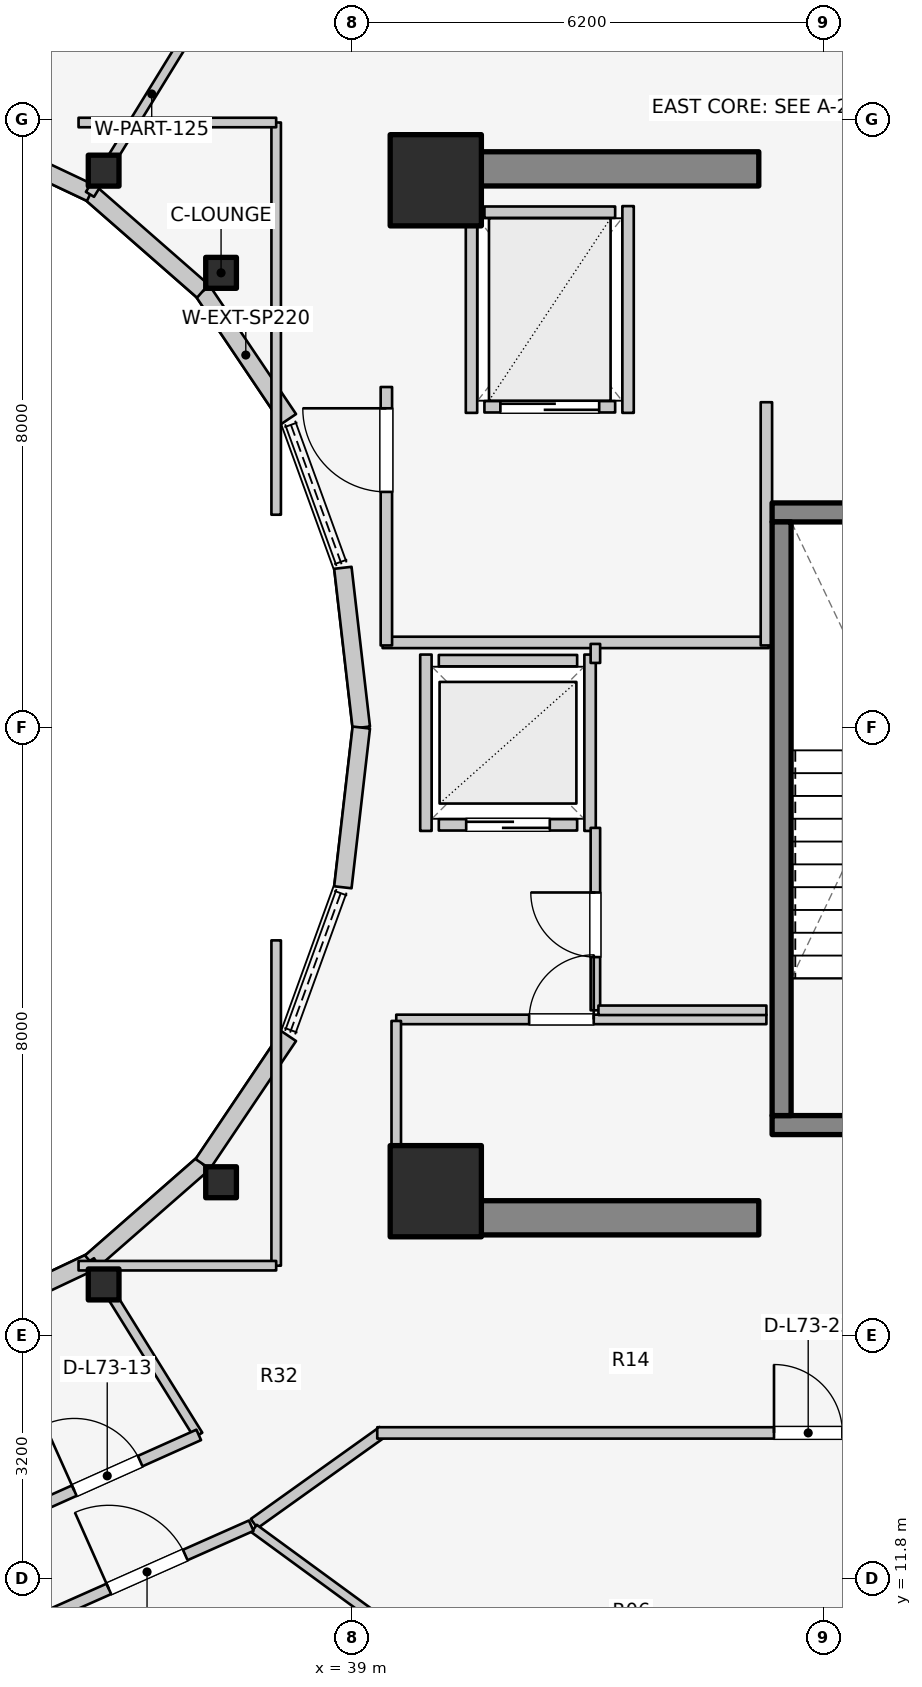
"""IFC4 building model, lengths in metres.
Left out: names, types, materials, properties, quantities, classifications, styles, units other than length and angle.
Written with IfcOpenShell. Run it as: python <this file> out.ifc"""

import sys

from ifc_helpers import new_model, si_unit, direction, frame, frame_2d, origin, origin_2d, place, context, subcontext, project, spatial, rectangle, i_section, extrude, element, fill, save


model = new_model("IFC4")
c1 = context("Model", 3, precision=1e-05, world=origin(), true_north=direction((0.0, 1.0)))
c2 = subcontext(c1, "Body", "Model", "MODEL_VIEW")
j1 = project(units=[si_unit("LENGTHUNIT", "METRE"), si_unit("PLANEANGLEUNIT", "RADIAN")], contexts=[c1])
p1 = place(None, origin())
s1 = spatial("IfcSite", under=j1, at=p1, CompositionType="ELEMENT")
p2 = place(p1, origin())
s2 = spatial("IfcBuilding", under=s1, at=p2, CompositionType="ELEMENT")
p3 = place(p2, frame((0.0, 0.0, 238.8)))
s3 = spatial("IfcBuildingStorey", under=s2, at=p3, CompositionType="ELEMENT", Elevation=238.8)
for number, where, z_axis, x_axis in (
    (1, (39.85, 16.55, 0.0), (0.0, 0.0, 1.0), (1.0, 0.0, 0.0)),
    (2, (39.85, 30.35, 0.0), (0.0, 0.0, 1.0), (1.0, 0.0, 0.0)),
):
    element("IfcWall", number, at=place(p3, frame(where, z_axis=z_axis, x_axis=x_axis)), inside=s3, PredefinedType="SHEAR", context=c2, shape_type="SweptSolid", body=[
        extrude(rectangle(XDim=4.5, YDim=0.45, at=frame_2d((2.25, 0.0))), origin(), (0.0, 0.0, 1.0), 3.6),
    ])
p4 = place(p3, frame((44.525, 17.77, 0.0), z_axis=(0.0, 0.0, 1.0), x_axis=(1.0, 0.0, 0.0)))
e3 = element("IfcWall", 3, at=p4, inside=s3, PredefinedType="SOLIDWALL", context=c2, shape_type="SweptSolid", body=[
    extrude(rectangle(XDim=3.37, YDim=0.25, at=frame_2d((1.685, 0.0))), origin(), (0.0, 0.0, 1.0), 3.6),
])
p5 = place(p4, frame((1.135, 0.0, 0.0)))
e4 = element("IfcOpeningElement", 4, at=p5, cuts=e3, PredefinedType="OPENING", context=c2, shape_type="SweptSolid", body=[
    extrude(rectangle(XDim=1.1, YDim=2.1, at=frame_2d((0.55, 1.05))), frame((0.0, 0.135, 0.0), z_axis=(0.0, -1.0, 0.0), x_axis=(1.0, 0.0, 0.0)), (0.0, 0.0, 1.0), 0.27),
])
p6 = place(p3, frame((44.525, 25.83, 0.0), z_axis=(0.0, 0.0, 1.0), x_axis=(1.0, 0.0, 0.0)))
e5 = element("IfcWall", 5, at=p6, inside=s3, PredefinedType="SOLIDWALL", context=c2, shape_type="SweptSolid", body=[
    extrude(rectangle(XDim=3.37, YDim=0.25, at=frame_2d((1.685, 0.0))), origin(), (0.0, 0.0, 1.0), 3.6),
])
p7 = place(p3, frame((44.65, 17.895, 0.0), z_axis=(0.0, 0.0, 1.0), x_axis=(0.0, 1.0, 0.0)))
e6 = element("IfcWall", 6, at=p7, inside=s3, PredefinedType="SOLIDWALL", context=c2, shape_type="SweptSolid", body=[
    extrude(rectangle(XDim=7.81, YDim=0.25, at=frame_2d((3.905, 0.0))), origin(), (0.0, 0.0, 1.0), 3.6),
])
for number, where, z_axis, x_axis in (
    (7, (40.1, 16.9, 0.0), (0.0, 0.0, 1.0), (1.0, 0.0, 0.0)),
    (8, (40.1, 30.2, 0.0), (0.0, 0.0, 1.0), (1.0, 0.0, 0.0)),
):
    element("IfcColumn", number, at=place(p3, frame(where, z_axis=z_axis, x_axis=x_axis)), inside=s3, PredefinedType="COLUMN", context=c2, shape_type="SweptSolid", body=[
        extrude(rectangle(XDim=1.2, YDim=1.2, at=origin_2d()), origin(), (0.0, 0.0, 1.0), 3.6),
    ])
for number, where, z_axis, x_axis in (
    (9, (37.275, 28.982, 0.0), (0.0, 0.0, 1.0), (1.0, 0.0, 0.0)),
    (10, (35.73, 30.327, 0.0), (0.0, 0.0, 1.0), (1.0, 0.0, 0.0)),
    (11, (35.73, 15.673, 0.0), (0.0, 0.0, 1.0), (1.0, 0.0, 0.0)),
    (12, (37.275, 17.018, 0.0), (0.0, 0.0, 1.0), (1.0, 0.0, 0.0)),
):
    element("IfcColumn", number, at=place(p3, frame(where, z_axis=z_axis, x_axis=x_axis)), inside=s3, PredefinedType="COLUMN", context=c2, shape_type="SweptSolid", body=[
        extrude(i_section(OverallWidth=0.404, OverallDepth=0.407, WebThickness=0.027, FlangeThickness=0.044, FilletRadius=0.025, at=origin_2d()), origin(), (0.0, 0.0, 1.0), 3.6),
    ])
p8 = place(p3, frame((39.12, 23.0, 0.0), z_axis=(0.0, 0.0, 1.0), x_axis=(-0.114711713601, 0.993398823617, 0.0)))
e13 = element("IfcWall", 13, at=p8, inside=s3, PredefinedType="STANDARD", context=c2, shape_type="SweptSolid", body=[
    extrude(rectangle(XDim=2.115, YDim=0.23, at=frame_2d((1.058, 0.0))), origin(), (0.0, 0.0, 1.0), 3.28),
])
p9 = place(p3, frame((38.166, 27.06, 0.0), z_axis=(0.0, 0.0, 1.0), x_axis=(-0.558197800898, 0.829707909492, 0.0)))
e14 = element("IfcWall", 14, at=p9, inside=s3, PredefinedType="STANDARD", context=c2, shape_type="SweptSolid", body=[
    extrude(rectangle(XDim=2.027, YDim=0.23, at=frame_2d((1.013, 0.0))), origin(), (0.0, 0.0, 1.0), 2.6),
])
p10 = place(p3, frame((37.035, 28.742, 0.0), z_axis=(0.0, 0.0, 1.0), x_axis=(-0.752576694707, 0.658504607869, 0.0)))
e15 = element("IfcWall", 15, at=p10, inside=s3, PredefinedType="STANDARD", context=c2, shape_type="SweptSolid", body=[
    extrude(rectangle(XDim=1.959, YDim=0.23, at=frame_2d((0.98, 0.0))), origin(), (0.0, 0.0, 1.0), 2.6),
])
for number, where, z_axis, x_axis in (
    (16, (35.56, 30.032, 0.0), (0.0, 0.0, 1.0), (-0.904, 0.427, 0.0)),
    (17, (33.843, 15.157, 0.0), (0.0, 0.0, 1.0), (0.904, 0.427, 0.0)),
):
    element("IfcWall", number, at=place(p3, frame(where, z_axis=z_axis, x_axis=x_axis)), inside=s3, PredefinedType="STANDARD", context=c2, shape_type="SweptSolid", body=[
        extrude(rectangle(XDim=1.899, YDim=0.23, at=frame_2d((0.95, 0.0))), origin(), (0.0, 0.0, 1.0), 2.6),
    ])
p11 = place(p3, frame((35.56, 15.968, 0.0), z_axis=(0.0, 0.0, 1.0), x_axis=(0.752576694707, 0.658504607869, 0.0)))
e18 = element("IfcWall", 18, at=p11, inside=s3, PredefinedType="STANDARD", context=c2, shape_type="SweptSolid", body=[
    extrude(rectangle(XDim=1.959, YDim=0.23, at=frame_2d((0.98, 0.0))), origin(), (0.0, 0.0, 1.0), 2.6),
])
p12 = place(p3, frame((37.035, 17.258, 0.0), z_axis=(0.0, 0.0, 1.0), x_axis=(0.558197800898, 0.829707909492, 0.0)))
e19 = element("IfcWall", 19, at=p12, inside=s3, PredefinedType="STANDARD", context=c2, shape_type="SweptSolid", body=[
    extrude(rectangle(XDim=2.027, YDim=0.23, at=frame_2d((1.013, 0.0))), origin(), (0.0, 0.0, 1.0), 2.6),
])
p13 = place(p3, frame((38.877, 20.898, 0.0), z_axis=(0.0, 0.0, 1.0), x_axis=(0.114711713601, 0.993398823617, 0.0)))
e20 = element("IfcWall", 20, at=p13, inside=s3, PredefinedType="STANDARD", context=c2, shape_type="SweptSolid", body=[
    extrude(rectangle(XDim=2.115, YDim=0.23, at=frame_2d((1.058, 0.0))), origin(), (0.0, 0.0, 1.0), 3.28),
])
p14 = place(p3, frame((40.14, 21.72, 0.0), z_axis=(0.0, 0.0, 1.0), x_axis=(1.0, 0.0, 0.0)))
e21 = element("IfcWall", 21, at=p14, inside=s3, PredefinedType="SOLIDWALL", context=c2, shape_type="SweptSolid", body=[
    extrude(rectangle(XDim=1.82, YDim=0.15, at=frame_2d((0.91, 0.0))), origin(), (0.0, 0.0, 1.0), 2.62),
])
p15 = place(p14, frame((0.36, 0.0, 0.0)))
e22 = element("IfcOpeningElement", 22, at=p15, cuts=e21, PredefinedType="OPENING", context=c2, shape_type="SweptSolid", body=[
    extrude(rectangle(XDim=1.1, YDim=2.1, at=frame_2d((0.55, 1.05))), frame((0.0, 0.085, 0.0), z_axis=(0.0, -1.0, 0.0), x_axis=(1.0, 0.0, 0.0)), (0.0, 0.0, 1.0), 0.17),
])
p16 = place(p3, frame((40.14, 23.88, 0.0), z_axis=(0.0, 0.0, 1.0), x_axis=(1.0, 0.0, 0.0)))
e23 = element("IfcWall", 23, at=p16, inside=s3, PredefinedType="SOLIDWALL", context=c2, shape_type="SweptSolid", body=[
    extrude(rectangle(XDim=1.82, YDim=0.15, at=frame_2d((0.91, 0.0))), origin(), (0.0, 0.0, 1.0), 2.62),
])
p17 = place(p3, frame((39.97, 21.64, 0.0), z_axis=(0.0, 0.0, 1.0), x_axis=(0.0, 1.0, 0.0)))
e24 = element("IfcWall", 24, at=p17, inside=s3, PredefinedType="SOLIDWALL", context=c2, shape_type="SweptSolid", body=[
    extrude(rectangle(XDim=2.32, YDim=0.15, at=frame_2d((1.16, 0.0))), origin(), (0.0, 0.0, 1.0), 2.62),
])
p18 = place(p3, frame((42.13, 21.64, 0.0), z_axis=(0.0, 0.0, 1.0), x_axis=(0.0, 1.0, 0.0)))
e25 = element("IfcWall", 25, at=p18, inside=s3, PredefinedType="SOLIDWALL", context=c2, shape_type="SweptSolid", body=[
    extrude(rectangle(XDim=2.32, YDim=0.15, at=frame_2d((1.16, 0.0))), origin(), (0.0, 0.0, 1.0), 3.295),
])
p19 = place(p3, frame((40.74, 27.22, 0.0), z_axis=(0.0, 0.0, 1.0), x_axis=(1.0, 0.0, 0.0)))
e26 = element("IfcWall", 26, at=p19, inside=s3, PredefinedType="SOLIDWALL", context=c2, shape_type="SweptSolid", body=[
    extrude(rectangle(XDim=1.72, YDim=0.15, at=frame_2d((0.86, 0.0))), origin(), (0.0, 0.0, 1.0), 3.295),
])
p20 = place(p19, frame((0.21, 0.0, 0.0)))
e27 = element("IfcOpeningElement", 27, at=p20, cuts=e26, PredefinedType="OPENING", context=c2, shape_type="SweptSolid", body=[
    extrude(rectangle(XDim=1.3, YDim=2.1, at=frame_2d((0.65, 1.05))), frame((0.0, 0.085, 0.0), z_axis=(0.0, -1.0, 0.0), x_axis=(1.0, 0.0, 0.0)), (0.0, 0.0, 1.0), 0.17),
])
p21 = place(p3, frame((40.74, 29.78, 0.0), z_axis=(0.0, 0.0, 1.0), x_axis=(1.0, 0.0, 0.0)))
e28 = element("IfcWall", 28, at=p21, inside=s3, PredefinedType="SOLIDWALL", context=c2, shape_type="SweptSolid", body=[
    extrude(rectangle(XDim=1.72, YDim=0.15, at=frame_2d((0.86, 0.0))), origin(), (0.0, 0.0, 1.0), 3.295),
])
for number, where, z_axis, x_axis in (
    (29, (40.57, 27.14, 0.0), (0.0, 0.0, 1.0), (0.0, 1.0, 0.0)),
    (30, (42.63, 27.14, 0.0), (0.0, 0.0, 1.0), (0.0, 1.0, 0.0)),
):
    element("IfcWall", number, at=place(p3, frame(where, z_axis=z_axis, x_axis=x_axis)), inside=s3, PredefinedType="SOLIDWALL", context=c2, shape_type="SweptSolid", body=[
        extrude(rectangle(XDim=2.72, YDim=0.15, at=frame_2d((1.36, 0.0))), origin(), (0.0, 0.0, 1.0), 3.295),
    ])
p22 = place(p3, frame((39.4, 24.12, 0.0), z_axis=(0.0, 0.0, 1.0), x_axis=(1.0, 0.0, 0.0)))
e31 = element("IfcWall", 31, at=p22, inside=s3, PredefinedType="PARTITIONING", context=c2, shape_type="SweptSolid", body=[
    extrude(rectangle(XDim=5.08, YDim=0.15, at=frame_2d((2.54, 0.0))), origin(), (0.0, 0.0, 1.0), 2.62),
])
p23 = place(p3, frame((44.45, 24.08, 0.0), z_axis=(0.0, 0.0, 1.0), x_axis=(0.0, 1.0, 0.0)))
e32 = element("IfcWall", 32, at=p23, inside=s3, PredefinedType="PARTITIONING", context=c2, shape_type="SweptSolid", body=[
    extrude(rectangle(XDim=3.2, YDim=0.15, at=frame_2d((1.6, 0.0))), origin(), (0.0, 0.0, 1.0), 3.295),
])
p24 = place(p3, frame((39.45, 24.08, 0.0), z_axis=(0.0, 0.0, 1.0), x_axis=(0.0, 1.0, 0.0)))
e33 = element("IfcWall", 33, at=p24, inside=s3, PredefinedType="PARTITIONING", context=c2, shape_type="SweptSolid", body=[
    extrude(rectangle(XDim=3.4, YDim=0.15, at=frame_2d((1.7, 0.0))), origin(), (0.0, 0.0, 1.0), 3.295),
])
p25 = place(p24, frame((2.02, 0.0, 0.0)))
e34 = element("IfcOpeningElement", 34, at=p25, cuts=e33, PredefinedType="OPENING", context=c2, shape_type="SweptSolid", body=[
    extrude(rectangle(XDim=1.1, YDim=2.1, at=frame_2d((0.55, 1.05))), frame((0.0, 0.085, 0.0), z_axis=(0.0, -1.0, 0.0), x_axis=(1.0, 0.0, 0.0)), (0.0, 0.0, 1.0), 0.17),
])
p26 = place(p3, frame((39.58, 19.16, 0.0), z_axis=(0.0, 0.0, 1.0), x_axis=(1.0, 0.0, 0.0)))
e35 = element("IfcWall", 35, at=p26, inside=s3, PredefinedType="PARTITIONING", context=c2, shape_type="SweptSolid", body=[
    extrude(rectangle(XDim=4.87, YDim=0.125, at=frame_2d((2.435, 0.0))), origin(), (0.0, 0.0, 1.0), 2.62),
])
p27 = place(p26, frame((1.748, 0.0, 0.0)))
e36 = element("IfcOpeningElement", 36, at=p27, cuts=e35, PredefinedType="OPENING", context=c2, shape_type="SweptSolid", body=[
    extrude(rectangle(XDim=0.85, YDim=2.05, at=frame_2d((0.425, 1.025))), frame((0.0, 0.073, 0.0), z_axis=(0.0, -1.0, 0.0), x_axis=(1.0, 0.0, 0.0)), (0.0, 0.0, 1.0), 0.145),
])
p28 = place(p3, frame((39.58, 17.1, 0.0), z_axis=(0.0, 0.0, 1.0), x_axis=(0.0, 1.0, 0.0)))
e37 = element("IfcWall", 37, at=p28, inside=s3, PredefinedType="PARTITIONING", context=c2, shape_type="SweptSolid", body=[
    extrude(rectangle(XDim=2.04, YDim=0.125, at=frame_2d((1.02, 0.0))), origin(), (0.0, 0.0, 1.0), 2.672),
])
p29 = place(p3, frame((42.2, 19.28, 0.0), z_axis=(0.0, 0.0, 1.0), x_axis=(0.0, 1.0, 0.0)))
e38 = element("IfcWall", 38, at=p29, inside=s3, PredefinedType="PARTITIONING", context=c2, shape_type="SweptSolid", body=[
    extrude(rectangle(XDim=2.4, YDim=0.125, at=frame_2d((1.2, 0.0))), origin(), (0.0, 0.0, 1.0), 3.295),
])
p30 = place(p29, frame((0.7, 0.0, 0.0)))
e39 = element("IfcOpeningElement", 39, at=p30, cuts=e38, PredefinedType="OPENING", context=c2, shape_type="SweptSolid", body=[
    extrude(rectangle(XDim=0.85, YDim=2.05, at=frame_2d((0.425, 1.025))), frame((0.0, 0.073, 0.0), z_axis=(0.0, -1.0, 0.0), x_axis=(1.0, 0.0, 0.0)), (0.0, 0.0, 1.0), 0.145),
])
p31 = place(p3, frame((42.2, 23.85, 0.0), z_axis=(0.0, 0.0, 1.0), x_axis=(0.0, 1.0, 0.0)))
e40 = element("IfcWall", 40, at=p31, inside=s3, PredefinedType="PARTITIONING", context=c2, shape_type="SweptSolid", body=[
    extrude(rectangle(XDim=0.25, YDim=0.125, at=frame_2d((0.125, 0.0))), origin(), (0.0, 0.0, 1.0), 3.295),
])
p32 = place(p3, frame((42.24, 19.28, 0.0), z_axis=(0.0, 0.0, 1.0), x_axis=(1.0, 0.0, 0.0)))
e41 = element("IfcWall", 41, at=p32, inside=s3, PredefinedType="PARTITIONING", context=c2, shape_type="SweptSolid", body=[
    extrude(rectangle(XDim=2.21, YDim=0.125, at=frame_2d((1.105, 0.0))), origin(), (0.0, 0.0, 1.0), 2.62),
])
p33 = place(p3, frame((35.55, 30.015, 0.0), z_axis=(0.0, 0.0, 1.0), x_axis=(0.523992004803, 0.851723182086, 0.0)))
e42 = element("IfcWall", 42, at=p33, inside=s3, PredefinedType="PARTITIONING", context=c2, shape_type="SweptSolid", body=[
    extrude(rectangle(XDim=3.101, YDim=0.125, at=frame_2d((1.551, 0.0))), origin(), (0.0, 0.0, 1.0), 2.672),
])
p34 = place(p3, frame((35.55, 15.985, 0.0), z_axis=(0.0, 0.0, 1.0), x_axis=(0.527527080983, -0.849538215049, 0.0)))
e43 = element("IfcWall", 43, at=p34, inside=s3, PredefinedType="PARTITIONING", context=c2, shape_type="SweptSolid", body=[
    extrude(rectangle(XDim=2.701, YDim=0.125, at=frame_2d((1.351, 0.0))), origin(), (0.0, 0.0, 1.0), 2.672),
])
p35 = place(p3, frame((34.573, 12.616, 0.0), z_axis=(0.0, 0.0, 1.0), x_axis=(0.912628408652, 0.408790151203, 0.0)))
e44 = element("IfcWall", 44, at=p35, inside=s3, PredefinedType="PARTITIONING", context=c2, shape_type="SweptSolid", body=[
    extrude(rectangle(XDim=2.638, YDim=0.15, at=frame_2d((1.319, 0.0))), origin(), (0.0, 0.0, 1.0), 2.816),
])
p36 = place(p35, frame((0.844, 0.0, 0.0)))
e45 = element("IfcOpeningElement", 45, at=p36, cuts=e44, PredefinedType="OPENING", context=c2, shape_type="SweptSolid", body=[
    extrude(rectangle(XDim=0.95, YDim=2.1, at=frame_2d((0.475, 1.05))), frame((0.0, 0.085, 0.0), z_axis=(0.0, -1.0, 0.0), x_axis=(1.0, 0.0, 0.0)), (0.0, 0.0, 1.0), 0.17),
])
p37 = place(p3, frame((38.0, 25.8, 0.0), z_axis=(0.0, 0.0, 1.0), x_axis=(0.0, 1.0, 0.0)))
e46 = element("IfcWall", 46, at=p37, inside=s3, PredefinedType="PARTITIONING", context=c2, shape_type="SweptSolid", body=[
    extrude(rectangle(XDim=5.16, YDim=0.125, at=frame_2d((2.58, 0.0))), origin(), (0.0, 0.0, 1.0), 2.672),
])
p38 = place(p3, frame((35.4, 30.96, 0.0), z_axis=(0.0, 0.0, 1.0), x_axis=(1.0, 0.0, 0.0)))
e47 = element("IfcWall", 47, at=p38, inside=s3, PredefinedType="PARTITIONING", context=c2, shape_type="SweptSolid", body=[
    extrude(rectangle(XDim=2.6, YDim=0.125, at=frame_2d((1.3, 0.0))), origin(), (0.0, 0.0, 1.0), 2.816),
])
p39 = place(p3, frame((38.0, 15.92, 0.0), z_axis=(0.0, 0.0, 1.0), x_axis=(0.0, 1.0, 0.0)))
e48 = element("IfcWall", 48, at=p39, inside=s3, PredefinedType="PARTITIONING", context=c2, shape_type="SweptSolid", body=[
    extrude(rectangle(XDim=4.28, YDim=0.125, at=frame_2d((2.14, 0.0))), origin(), (0.0, 0.0, 1.0), 2.672),
])
p40 = place(p3, frame((35.4, 15.92, 0.0), z_axis=(0.0, 0.0, 1.0), x_axis=(1.0, 0.0, 0.0)))
e49 = element("IfcWall", 49, at=p40, inside=s3, PredefinedType="PARTITIONING", context=c2, shape_type="SweptSolid", body=[
    extrude(rectangle(XDim=2.6, YDim=0.125, at=frame_2d((1.3, 0.0))), origin(), (0.0, 0.0, 1.0), 2.672),
])
p41 = place(p3, frame((37.71, 12.527, 0.0), z_axis=(0.0, 0.0, 1.0), x_axis=(0.813780999276, 0.581171648669, 0.0)))
e50 = element("IfcWall", 50, at=p41, inside=s3, PredefinedType="PARTITIONING", context=c2, shape_type="SweptSolid", body=[
    extrude(rectangle(XDim=2.082, YDim=0.15, at=frame_2d((1.041, 0.0))), origin(), (0.0, 0.0, 1.0), 2.816),
])
p42 = place(p3, frame((39.33, 13.72, 0.0), z_axis=(0.0, 0.0, 1.0), x_axis=(1.0, 0.0, 0.0)))
e51 = element("IfcWall", 51, at=p42, inside=s3, PredefinedType="PARTITIONING", context=c2, shape_type="SweptSolid", body=[
    extrude(rectangle(XDim=7.52, YDim=0.15, at=frame_2d((3.76, 0.0))), origin(), (0.0, 0.0, 1.0), 2.816),
])
p43 = place(p42, frame((5.22, 0.0, 0.0)))
e52 = element("IfcOpeningElement", 52, at=p43, cuts=e51, PredefinedType="OPENING", context=c2, shape_type="SweptSolid", body=[
    extrude(rectangle(XDim=0.9, YDim=2.1, at=frame_2d((0.45, 1.05))), frame((0.0, 0.085, 0.0), z_axis=(0.0, -1.0, 0.0), x_axis=(1.0, 0.0, 0.0)), (0.0, 0.0, 1.0), 0.17),
])
p44 = place(p3, frame((37.709, 12.463, 0.0), z_axis=(0.0, 0.0, 1.0), x_axis=(0.807095694912, -0.590420646027, 0.0)))
e53 = element("IfcWall", 53, at=p44, inside=s3, PredefinedType="MOVABLE", context=c2, shape_type="SweptSolid", body=[
    extrude(rectangle(XDim=7.119, YDim=0.12, at=frame_2d((3.56, 0.0))), origin(), (0.0, 0.0, 1.0), 2.66),
])
p45 = place(p3, frame((34.93, 11.283, 0.0), z_axis=(0.0, 0.0, 1.0), x_axis=(0.914043013008, 0.4056172708, 0.0)))
e54 = element("IfcWall", 54, at=p45, inside=s3, PredefinedType="PARTITIONING", context=c2, shape_type="SweptSolid", body=[
    extrude(rectangle(XDim=2.999, YDim=0.15, at=frame_2d((1.5, 0.0))), origin(), (0.0, 0.0, 1.0), 2.816),
])
p46 = place(p45, frame((0.949, 0.0, 0.0)))
e55 = element("IfcOpeningElement", 55, at=p46, cuts=e54, PredefinedType="OPENING", context=c2, shape_type="SweptSolid", body=[
    extrude(rectangle(XDim=1.1, YDim=2.1, at=frame_2d((0.55, 1.05))), frame((0.0, 0.085, 0.0), z_axis=(0.0, -1.0, 0.0), x_axis=(1.0, 0.0, 0.0)), (0.0, 0.0, 1.0), 0.17),
])
p47 = place(p15, origin())
e56 = element("IfcDoor", 56, at=p47, inside=s3, OperationType="DOUBLE_DOOR_SLIDING", PredefinedType="DOOR", context=c2, shape_type="SweptSolid", body=[
    extrude(rectangle(XDim=1.1, YDim=2.1, at=frame_2d((0.55, 1.05))), frame((0.0, 0.025, 0.0), z_axis=(0.0, -1.0, 0.0), x_axis=(1.0, 0.0, 0.0)), (0.0, 0.0, 1.0), 0.05),
])
fill(e22, e56)
p48 = place(p20, origin())
e57 = element("IfcDoor", 57, at=p48, inside=s3, OperationType="DOUBLE_DOOR_SLIDING", PredefinedType="DOOR", context=c2, shape_type="SweptSolid", body=[
    extrude(rectangle(XDim=1.3, YDim=2.1, at=frame_2d((0.65, 1.05))), frame((0.0, 0.025, 0.0), z_axis=(0.0, -1.0, 0.0), x_axis=(1.0, 0.0, 0.0)), (0.0, 0.0, 1.0), 0.05),
])
fill(e27, e57)
p49 = place(p25, origin())
e58 = element("IfcDoor", 58, at=p49, inside=s3, OperationType="SINGLE_SWING_RIGHT", PredefinedType="DOOR", context=c2, shape_type="SweptSolid", body=[
    extrude(rectangle(XDim=1.1, YDim=2.1, at=frame_2d((0.55, 1.05))), frame((0.0, 0.025, 0.0), z_axis=(0.0, -1.0, 0.0), x_axis=(1.0, 0.0, 0.0)), (0.0, 0.0, 1.0), 0.05),
])
fill(e34, e58)
p50 = place(p27, origin())
e59 = element("IfcDoor", 59, at=p50, inside=s3, OperationType="SINGLE_SWING_RIGHT", PredefinedType="DOOR", context=c2, shape_type="SweptSolid", body=[
    extrude(rectangle(XDim=0.85, YDim=2.05, at=frame_2d((0.425, 1.025))), frame((0.0, 0.025, 0.0), z_axis=(0.0, -1.0, 0.0), x_axis=(1.0, 0.0, 0.0)), (0.0, 0.0, 1.0), 0.05),
])
fill(e36, e59)
p51 = place(p30, origin())
e60 = element("IfcDoor", 60, at=p51, inside=s3, OperationType="SINGLE_SWING_RIGHT", PredefinedType="DOOR", context=c2, shape_type="SweptSolid", body=[
    extrude(rectangle(XDim=0.85, YDim=2.05, at=frame_2d((0.425, 1.025))), frame((0.0, 0.025, 0.0), z_axis=(0.0, -1.0, 0.0), x_axis=(1.0, 0.0, 0.0)), (0.0, 0.0, 1.0), 0.05),
])
fill(e39, e60)
p52 = place(p36, origin())
e61 = element("IfcDoor", 61, at=p52, inside=s3, OperationType="SINGLE_SWING_LEFT", PredefinedType="DOOR", context=c2, shape_type="SweptSolid", body=[
    extrude(rectangle(XDim=0.95, YDim=2.1, at=frame_2d((0.475, 1.05))), frame((0.0, 0.025, 0.0), z_axis=(0.0, -1.0, 0.0), x_axis=(1.0, 0.0, 0.0)), (0.0, 0.0, 1.0), 0.05),
])
fill(e45, e61)
p53 = place(p43, origin())
e62 = element("IfcDoor", 62, at=p53, inside=s3, OperationType="SINGLE_SWING_LEFT", PredefinedType="DOOR", context=c2, shape_type="SweptSolid", body=[
    extrude(rectangle(XDim=0.9, YDim=2.1, at=frame_2d((0.45, 1.05))), frame((0.0, 0.025, 0.0), z_axis=(0.0, -1.0, 0.0), x_axis=(1.0, 0.0, 0.0)), (0.0, 0.0, 1.0), 0.05),
])
fill(e52, e62)
p54 = place(p46, origin())
e63 = element("IfcDoor", 63, at=p54, inside=s3, OperationType="SINGLE_SWING_LEFT", PredefinedType="DOOR", context=c2, shape_type="SweptSolid", body=[
    extrude(rectangle(XDim=1.1, YDim=2.1, at=frame_2d((0.55, 1.05))), frame((0.0, 0.025, 0.0), z_axis=(0.0, -1.0, 0.0), x_axis=(1.0, 0.0, 0.0)), (0.0, 0.0, 1.0), 0.05),
])
fill(e55, e63)
save(model, sys.argv[1])
